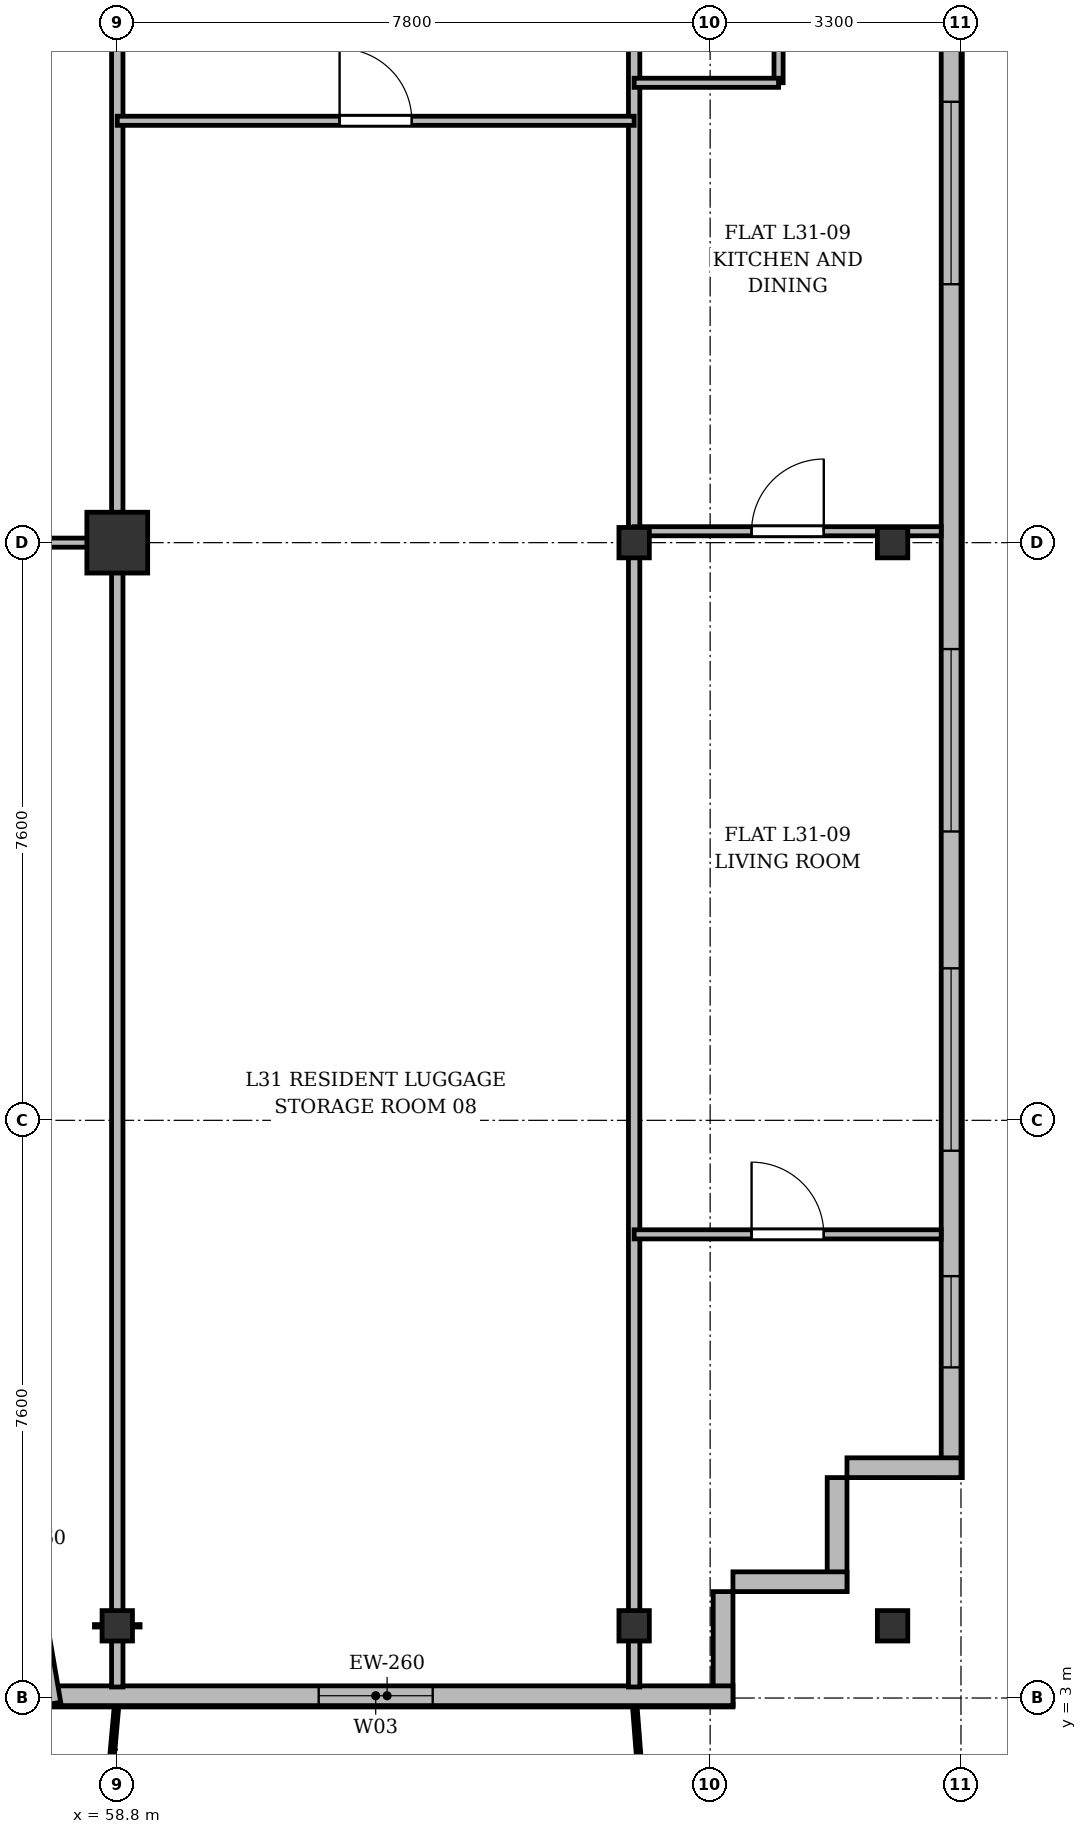
"""IFC4 building model, lengths in metres.
Left out: names, types, materials, properties, quantities, classifications, styles, units other than length and angle.
Written with IfcOpenShell. Run it as: python <this file> out.ifc"""

import sys

from ifc_helpers import new_model, si_unit, direction, frame, frame_2d, origin, origin_2d, place, context, subcontext, project, spatial, rectangle, i_section, extrude, source, transform, mapped, element, fill, save


model = new_model("IFC4")
c1 = context("Model", 3, precision=1e-05, world=origin(), true_north=direction((0.0, 1.0)))
c2 = subcontext(c1, "Body", "Model", "MODEL_VIEW")
j1 = project(units=[si_unit("LENGTHUNIT", "METRE"), si_unit("PLANEANGLEUNIT", "RADIAN")], contexts=[c1])
p1 = place(None, origin())
s1 = spatial("IfcSite", under=j1, at=p1, CompositionType="ELEMENT")
p2 = place(p1, origin())
s2 = spatial("IfcBuilding", under=s1, at=p2, CompositionType="ELEMENT")
p3 = place(p2, frame((0.0, 0.0, 121.3)))
s3 = spatial("IfcBuildingStorey", under=s2, at=p3, CompositionType="ELEMENT", Elevation=121.3)
m1 = source(origin(), c2, "Body", "SweptSolid", [
    extrude(i_section(OverallWidth=0.4, OverallDepth=0.4, WebThickness=0.022, FlangeThickness=0.035, at=origin_2d()), origin(), (0.0, 0.0, 1.0), 3.6),
])
p4 = place(p3, frame((58.8, 3.95, 0.0), z_axis=(0.0, 0.0, 1.0), x_axis=(1.0, 0.0, 0.0)))
e1 = element("IfcColumn", 1, at=p4, inside=s3, PredefinedType="COLUMN", context=c2, shape_type="MappedRepresentation", body=[
    mapped(m1, transform((0.0, 0.0, 0.0), x_axis=(1.0, 0.0, 0.0), y_axis=(0.0, 1.0, 0.0), z_axis=(0.0, 0.0, 1.0), scale=1.0)),
])
m2 = source(origin(), c2, "Body", "SweptSolid", [
    extrude(rectangle(XDim=0.8, YDim=0.8, at=origin_2d()), origin(), (0.0, 0.0, 1.0), 3.6),
])
p5 = place(p3, frame((58.8, 18.2, 0.0), z_axis=(0.0, 0.0, 1.0), x_axis=(1.0, 0.0, 0.0)))
e2 = element("IfcColumn", 2, at=p5, inside=s3, PredefinedType="COLUMN", context=c2, shape_type="MappedRepresentation", body=[
    mapped(m2, transform((0.0, 0.0, 0.0), x_axis=(1.0, 0.0, 0.0), y_axis=(0.0, 1.0, 0.0), z_axis=(0.0, 0.0, 1.0), scale=1.0)),
])
for number, where, z_axis, x_axis in (
    (3, (65.6, 3.95, 0.0), (0.0, 0.0, 1.0), (1.0, 0.0, 0.0)),
    (4, (65.6, 18.2, 0.0), (0.0, 0.0, 1.0), (1.0, 0.0, 0.0)),
    (5, (69.0, 3.95, 0.0), (0.0, 0.0, 1.0), (1.0, 0.0, 0.0)),
    (6, (69.0, 18.2, 0.0), (0.0, 0.0, 1.0), (1.0, 0.0, 0.0)),
):
    element("IfcColumn", number, at=place(p3, frame(where, z_axis=z_axis, x_axis=x_axis)), inside=s3, PredefinedType="COLUMN", context=c2, shape_type="MappedRepresentation", body=[
        mapped(m1, transform((0.0, 0.0, 0.0), x_axis=(1.0, 0.0, 0.0), y_axis=(0.0, 1.0, 0.0), z_axis=(0.0, 0.0, 1.0), scale=1.0)),
    ])
p6 = place(p3, frame((69.77, 45.5, 0.0), z_axis=(0.0, 0.0, 1.0), x_axis=(0.0, -1.0, 0.0)))
e7 = element("IfcWall", 7, at=p6, inside=s3, PredefinedType="SOLIDWALL", context=c2, shape_type="SweptSolid", body=[
    extrude(rectangle(XDim=39.6, YDim=0.26, at=frame_2d((19.8, 0.0))), origin(), (0.0, 0.0, 1.0), 3.34),
])
p7 = place(p6, frame((36.95, 0.0, 0.92)))
e8 = element("IfcOpeningElement", 8, at=p7, cuts=e7, PredefinedType="OPENING", context=c2, shape_type="SweptSolid", body=[
    extrude(rectangle(XDim=1.2, YDim=1.65, at=frame_2d((0.6, 0.825))), frame((0.0, 0.14, 0.0), z_axis=(0.0, -1.0, 0.0), x_axis=(1.0, 0.0, 0.0)), (0.0, 0.0, 1.0), 0.28),
])
p8 = place(p6, frame((32.9, 0.0, 0.92)))
e9 = element("IfcOpeningElement", 9, at=p8, cuts=e7, PredefinedType="OPENING", context=c2, shape_type="SweptSolid", body=[
    extrude(rectangle(XDim=2.4, YDim=2.1, at=frame_2d((1.2, 1.05))), frame((0.0, 0.14, 0.0), z_axis=(0.0, -1.0, 0.0), x_axis=(1.0, 0.0, 0.0)), (0.0, 0.0, 1.0), 0.28),
])
p9 = place(p6, frame((28.7, 0.0, 0.92)))
e10 = element("IfcOpeningElement", 10, at=p9, cuts=e7, PredefinedType="OPENING", context=c2, shape_type="SweptSolid", body=[
    extrude(rectangle(XDim=2.4, YDim=2.1, at=frame_2d((1.2, 1.05))), frame((0.0, 0.14, 0.0), z_axis=(0.0, -1.0, 0.0), x_axis=(1.0, 0.0, 0.0)), (0.0, 0.0, 1.0), 0.28),
])
p10 = place(p6, frame((21.5, 0.0, 0.92)))
e11 = element("IfcOpeningElement", 11, at=p10, cuts=e7, PredefinedType="OPENING", context=c2, shape_type="SweptSolid", body=[
    extrude(rectangle(XDim=2.4, YDim=2.1, at=frame_2d((1.2, 1.05))), frame((0.0, 0.14, 0.0), z_axis=(0.0, -1.0, 0.0), x_axis=(1.0, 0.0, 0.0)), (0.0, 0.0, 1.0), 0.28),
])
p11 = place(p6, frame((7.5, 0.0, 0.92)))
e12 = element("IfcOpeningElement", 12, at=p11, cuts=e7, PredefinedType="OPENING", context=c2, shape_type="SweptSolid", body=[
    extrude(rectangle(XDim=2.4, YDim=2.1, at=frame_2d((1.2, 1.05))), frame((0.0, 0.14, 0.0), z_axis=(0.0, -1.0, 0.0), x_axis=(1.0, 0.0, 0.0)), (0.0, 0.0, 1.0), 0.28),
])
p12 = place(p6, frame((4.5, 0.0, 0.92)))
e13 = element("IfcOpeningElement", 13, at=p12, cuts=e7, PredefinedType="OPENING", context=c2, shape_type="SweptSolid", body=[
    extrude(rectangle(XDim=1.2, YDim=1.65, at=frame_2d((0.6, 0.825))), frame((0.0, 0.14, 0.0), z_axis=(0.0, -1.0, 0.0), x_axis=(1.0, 0.0, 0.0)), (0.0, 0.0, 1.0), 0.28),
])
p13 = place(p6, frame((1.15, 0.0, 0.92)))
e14 = element("IfcOpeningElement", 14, at=p13, cuts=e7, PredefinedType="OPENING", context=c2, shape_type="SweptSolid", body=[
    extrude(rectangle(XDim=1.2, YDim=1.65, at=frame_2d((0.6, 0.825))), frame((0.0, 0.14, 0.0), z_axis=(0.0, -1.0, 0.0), x_axis=(1.0, 0.0, 0.0)), (0.0, 0.0, 1.0), 0.28),
])
p14 = place(p3, frame((69.9, 6.03, 0.0), z_axis=(0.0, 0.0, 1.0), x_axis=(-1.0, 0.0, 0.0)))
e15 = element("IfcWall", 15, at=p14, inside=s3, PredefinedType="SOLIDWALL", context=c2, shape_type="SweptSolid", body=[
    extrude(rectangle(XDim=1.5, YDim=0.26, at=frame_2d((0.75, 0.0))), origin(), (0.0, 0.0, 1.0), 2.84),
])
for number, where, z_axis, x_axis in (
    (16, (68.27, 5.9, 0.0), (0.0, 0.0, 1.0), (0.0, -1.0, 0.0)),
    (17, (68.4, 4.53, 0.0), (0.0, 0.0, 1.0), (-1.0, 0.0, 0.0)),
):
    element("IfcWall", number, at=place(p3, frame(where, z_axis=z_axis, x_axis=x_axis)), inside=s3, PredefinedType="SOLIDWALL", context=c2, shape_type="SweptSolid", body=[
        extrude(rectangle(XDim=1.5, YDim=0.26, at=frame_2d((0.75, 0.0))), origin(), (0.0, 0.0, 1.0), 3.34),
    ])
p15 = place(p3, frame((66.77, 4.4, 0.0), z_axis=(0.0, 0.0, 1.0), x_axis=(0.0, -1.0, 0.0)))
e18 = element("IfcWall", 18, at=p15, inside=s3, PredefinedType="SOLIDWALL", context=c2, shape_type="SweptSolid", body=[
    extrude(rectangle(XDim=1.5, YDim=0.26, at=frame_2d((0.75, 0.0))), origin(), (0.0, 0.0, 1.0), 2.752),
])
p16 = place(p3, frame((66.9, 3.03, 0.0), z_axis=(0.0, 0.0, 1.0), x_axis=(-1.0, 0.0, 0.0)))
e19 = element("IfcWall", 19, at=p16, inside=s3, PredefinedType="SOLIDWALL", context=c2, shape_type="SweptSolid", body=[
    extrude(rectangle(XDim=9.1, YDim=0.26, at=frame_2d((4.55, 0.0))), origin(), (0.0, 0.0, 1.0), 3.34),
])
p17 = place(p16, frame((3.95, 0.0, 0.9)))
e20 = element("IfcOpeningElement", 20, at=p17, cuts=e19, PredefinedType="OPENING", context=c2, shape_type="SweptSolid", body=[
    extrude(rectangle(XDim=1.5, YDim=1.75, at=frame_2d((0.75, 0.875))), frame((0.0, 0.14, 0.0), z_axis=(0.0, -1.0, 0.0), x_axis=(1.0, 0.0, 0.0)), (0.0, 0.0, 1.0), 0.28),
])
p18 = place(p3, frame((57.928, 2.922, 0.0), z_axis=(0.0, 0.0, 1.0), x_axis=(-0.168923741424, 0.98562912375, 0.0)))
e21 = element("IfcWall", 21, at=p18, inside=s3, PredefinedType="SOLIDWALL", context=c2, shape_type="SweptSolid", body=[
    extrude(rectangle(XDim=3.551, YDim=0.26, at=frame_2d((1.775, 0.0))), origin(), (0.0, 0.0, 1.0), 2.752),
])
for number, where, z_axis, x_axis in (
    (22, (58.8, 3.145, 0.0), (0.0, 0.0, 1.0), (0.0, 1.0, 0.0)),
    (23, (65.6, 3.145, 0.0), (0.0, 0.0, 1.0), (0.0, 1.0, 0.0)),
):
    element("IfcWall", number, at=place(p3, frame(where, z_axis=z_axis, x_axis=x_axis)), inside=s3, PredefinedType="PARTITIONING", context=c2, shape_type="SweptSolid", body=[
        extrude(rectangle(XDim=24.455, YDim=0.15, at=frame_2d((12.228, 0.0))), origin(), (0.0, 0.0, 1.0), 2.84),
    ])
p19 = place(p3, frame((51.0, 18.2, 0.0), z_axis=(0.0, 0.0, 1.0), x_axis=(1.0, 0.0, 0.0)))
e24 = element("IfcWall", 24, at=p19, inside=s3, PredefinedType="PARTITIONING", context=c2, shape_type="SweptSolid", body=[
    extrude(rectangle(XDim=7.8, YDim=0.12, at=frame_2d((3.9, 0.0))), origin(), (0.0, 0.0, 1.0), 2.752),
])
p20 = place(p19, frame((3.333, 0.0, 0.0)))
e25 = element("IfcOpeningElement", 25, at=p20, cuts=e24, PredefinedType="OPENING", context=c2, shape_type="SweptSolid", body=[
    extrude(rectangle(XDim=0.95, YDim=2.15, at=frame_2d((0.475, 1.075))), frame((0.0, 0.07, 0.0), z_axis=(0.0, -1.0, 0.0), x_axis=(1.0, 0.0, 0.0)), (0.0, 0.0, 1.0), 0.14),
])
p21 = place(p3, frame((58.8, 23.75, 0.0), z_axis=(0.0, 0.0, 1.0), x_axis=(1.0, 0.0, 0.0)))
e26 = element("IfcWall", 26, at=p21, inside=s3, PredefinedType="PARTITIONING", context=c2, shape_type="SweptSolid", body=[
    extrude(rectangle(XDim=6.8, YDim=0.12, at=frame_2d((3.4, 0.0))), origin(), (0.0, 0.0, 1.0), 2.84),
])
p22 = place(p21, frame((2.925, 0.0, 0.0)))
e27 = element("IfcOpeningElement", 27, at=p22, cuts=e26, PredefinedType="OPENING", context=c2, shape_type="SweptSolid", body=[
    extrude(rectangle(XDim=0.95, YDim=2.15, at=frame_2d((0.475, 1.075))), frame((0.0, 0.07, 0.0), z_axis=(0.0, -1.0, 0.0), x_axis=(1.0, 0.0, 0.0)), (0.0, 0.0, 1.0), 0.14),
])
p23 = place(p3, frame((65.6, 18.35, 0.0), z_axis=(0.0, 0.0, 1.0), x_axis=(1.0, 0.0, 0.0)))
e28 = element("IfcWall", 28, at=p23, inside=s3, PredefinedType="PARTITIONING", context=c2, shape_type="SweptSolid", body=[
    extrude(rectangle(XDim=4.04, YDim=0.12, at=frame_2d((2.02, 0.0))), origin(), (0.0, 0.0, 1.0), 2.752),
])
p24 = place(p23, frame((1.545, 0.0, 0.0)))
e29 = element("IfcOpeningElement", 29, at=p24, cuts=e28, PredefinedType="OPENING", context=c2, shape_type="SweptSolid", body=[
    extrude(rectangle(XDim=0.95, YDim=2.15, at=frame_2d((0.475, 1.075))), frame((0.0, 0.07, 0.0), z_axis=(0.0, -1.0, 0.0), x_axis=(1.0, 0.0, 0.0)), (0.0, 0.0, 1.0), 0.14),
])
p25 = place(p3, frame((67.5, 24.25, 0.0), z_axis=(0.0, 0.0, 1.0), x_axis=(0.0, 1.0, 0.0)))
e30 = element("IfcWall", 30, at=p25, inside=s3, PredefinedType="PARTITIONING", context=c2, shape_type="SweptSolid", body=[
    extrude(rectangle(XDim=3.35, YDim=0.12, at=frame_2d((1.675, 0.0))), origin(), (0.0, 0.0, 1.0), 2.99),
])
p26 = place(p25, frame((0.8, 0.0, 0.0)))
e31 = element("IfcOpeningElement", 31, at=p26, cuts=e30, PredefinedType="OPENING", context=c2, shape_type="SweptSolid", body=[
    extrude(rectangle(XDim=0.85, YDim=2.1, at=frame_2d((0.425, 1.05))), frame((0.0, 0.07, 0.0), z_axis=(0.0, -1.0, 0.0), x_axis=(1.0, 0.0, 0.0)), (0.0, 0.0, 1.0), 0.14),
])
p27 = place(p3, frame((65.6, 24.25, 0.0), z_axis=(0.0, 0.0, 1.0), x_axis=(1.0, 0.0, 0.0)))
e32 = element("IfcWall", 32, at=p27, inside=s3, PredefinedType="PARTITIONING", context=c2, shape_type="SweptSolid", body=[
    extrude(rectangle(XDim=1.9, YDim=0.12, at=frame_2d((0.95, 0.0))), origin(), (0.0, 0.0, 1.0), 2.84),
])
p28 = place(p3, frame((65.6, 9.1, 0.0), z_axis=(0.0, 0.0, 1.0), x_axis=(1.0, 0.0, 0.0)))
e33 = element("IfcWall", 33, at=p28, inside=s3, PredefinedType="PARTITIONING", context=c2, shape_type="SweptSolid", body=[
    extrude(rectangle(XDim=4.04, YDim=0.12, at=frame_2d((2.02, 0.0))), origin(), (0.0, 0.0, 1.0), 2.84),
])
p29 = place(p28, frame((1.545, 0.0, 0.0)))
e34 = element("IfcOpeningElement", 34, at=p29, cuts=e33, PredefinedType="OPENING", context=c2, shape_type="SweptSolid", body=[
    extrude(rectangle(XDim=0.95, YDim=2.15, at=frame_2d((0.475, 1.075))), frame((0.0, 0.07, 0.0), z_axis=(0.0, -1.0, 0.0), x_axis=(1.0, 0.0, 0.0)), (0.0, 0.0, 1.0), 0.14),
])
m3 = source(origin(), c2, "Body", "SweptSolid", [
    extrude(rectangle(XDim=1.2, YDim=1.65, at=frame_2d((0.6, 0.825))), frame((0.0, 0.03, 0.0), z_axis=(0.0, -1.0, 0.0), x_axis=(1.0, 0.0, 0.0)), (0.0, 0.0, 1.0), 0.06),
])
p30 = place(p7, origin())
e35 = element("IfcWindow", 35, at=p30, inside=s3, PartitioningType="SINGLE_PANEL", PredefinedType="WINDOW", context=c2, shape_type="MappedRepresentation", body=[
    mapped(m3, transform((0.0, 0.0, 0.0), x_axis=(1.0, 0.0, 0.0), y_axis=(0.0, 1.0, 0.0), z_axis=(0.0, 0.0, 1.0), scale=1.0)),
])
fill(e8, e35)
m4 = source(origin(), c2, "Body", "SweptSolid", [
    extrude(rectangle(XDim=2.4, YDim=2.1, at=frame_2d((1.2, 1.05))), frame((0.0, 0.03, 0.0), z_axis=(0.0, -1.0, 0.0), x_axis=(1.0, 0.0, 0.0)), (0.0, 0.0, 1.0), 0.06),
])
p31 = place(p8, origin())
e36 = element("IfcWindow", 36, at=p31, inside=s3, PartitioningType="SINGLE_PANEL", PredefinedType="WINDOW", context=c2, shape_type="MappedRepresentation", body=[
    mapped(m4, transform((0.0, 0.0, 0.0), x_axis=(1.0, 0.0, 0.0), y_axis=(0.0, 1.0, 0.0), z_axis=(0.0, 0.0, 1.0), scale=1.0)),
])
fill(e9, e36)
p32 = place(p9, origin())
e37 = element("IfcWindow", 37, at=p32, inside=s3, PartitioningType="SINGLE_PANEL", PredefinedType="WINDOW", context=c2, shape_type="MappedRepresentation", body=[
    mapped(m4, transform((0.0, 0.0, 0.0), x_axis=(1.0, 0.0, 0.0), y_axis=(0.0, 1.0, 0.0), z_axis=(0.0, 0.0, 1.0), scale=1.0)),
])
fill(e10, e37)
p33 = place(p10, origin())
e38 = element("IfcWindow", 38, at=p33, inside=s3, PartitioningType="SINGLE_PANEL", PredefinedType="WINDOW", context=c2, shape_type="MappedRepresentation", body=[
    mapped(m4, transform((0.0, 0.0, 0.0), x_axis=(1.0, 0.0, 0.0), y_axis=(0.0, 1.0, 0.0), z_axis=(0.0, 0.0, 1.0), scale=1.0)),
])
fill(e11, e38)
m5 = source(origin(), c2, "Body", "SweptSolid", [
    extrude(rectangle(XDim=1.5, YDim=1.75, at=frame_2d((0.75, 0.875))), frame((0.0, 0.03, 0.0), z_axis=(0.0, -1.0, 0.0), x_axis=(1.0, 0.0, 0.0)), (0.0, 0.0, 1.0), 0.06),
])
p34 = place(p17, origin())
e39 = element("IfcWindow", 39, at=p34, inside=s3, PartitioningType="SINGLE_PANEL", PredefinedType="WINDOW", context=c2, shape_type="MappedRepresentation", body=[
    mapped(m5, transform((0.0, 0.0, 0.0), x_axis=(1.0, 0.0, 0.0), y_axis=(0.0, 1.0, 0.0), z_axis=(0.0, 0.0, 1.0), scale=1.0)),
])
fill(e20, e39)
m6 = source(origin(), c2, "Body", "SweptSolid", [
    extrude(rectangle(XDim=0.95, YDim=2.15, at=frame_2d((0.475, 1.075))), frame((0.0, 0.025, 0.0), z_axis=(0.0, -1.0, 0.0), x_axis=(1.0, 0.0, 0.0)), (0.0, 0.0, 1.0), 0.05),
])
p35 = place(p22, origin())
e40 = element("IfcDoor", 40, at=p35, inside=s3, OperationType="SINGLE_SWING_LEFT", PredefinedType="DOOR", context=c2, shape_type="MappedRepresentation", body=[
    mapped(m6, transform((0.0, 0.0, 0.0), x_axis=(1.0, 0.0, 0.0), y_axis=(0.0, 1.0, 0.0), z_axis=(0.0, 0.0, 1.0), scale=1.0)),
])
fill(e27, e40)
p36 = place(p24, origin())
e41 = element("IfcDoor", 41, at=p36, inside=s3, OperationType="SINGLE_SWING_RIGHT", PredefinedType="DOOR", context=c2, shape_type="MappedRepresentation", body=[
    mapped(m6, transform((0.0, 0.0, 0.0), x_axis=(1.0, 0.0, 0.0), y_axis=(0.0, 1.0, 0.0), z_axis=(0.0, 0.0, 1.0), scale=1.0)),
])
fill(e29, e41)
p37 = place(p29, origin())
e42 = element("IfcDoor", 42, at=p37, inside=s3, OperationType="SINGLE_SWING_LEFT", PredefinedType="DOOR", context=c2, shape_type="MappedRepresentation", body=[
    mapped(m6, transform((0.0, 0.0, 0.0), x_axis=(1.0, 0.0, 0.0), y_axis=(0.0, 1.0, 0.0), z_axis=(0.0, 0.0, 1.0), scale=1.0)),
])
fill(e34, e42)
save(model, sys.argv[1])
